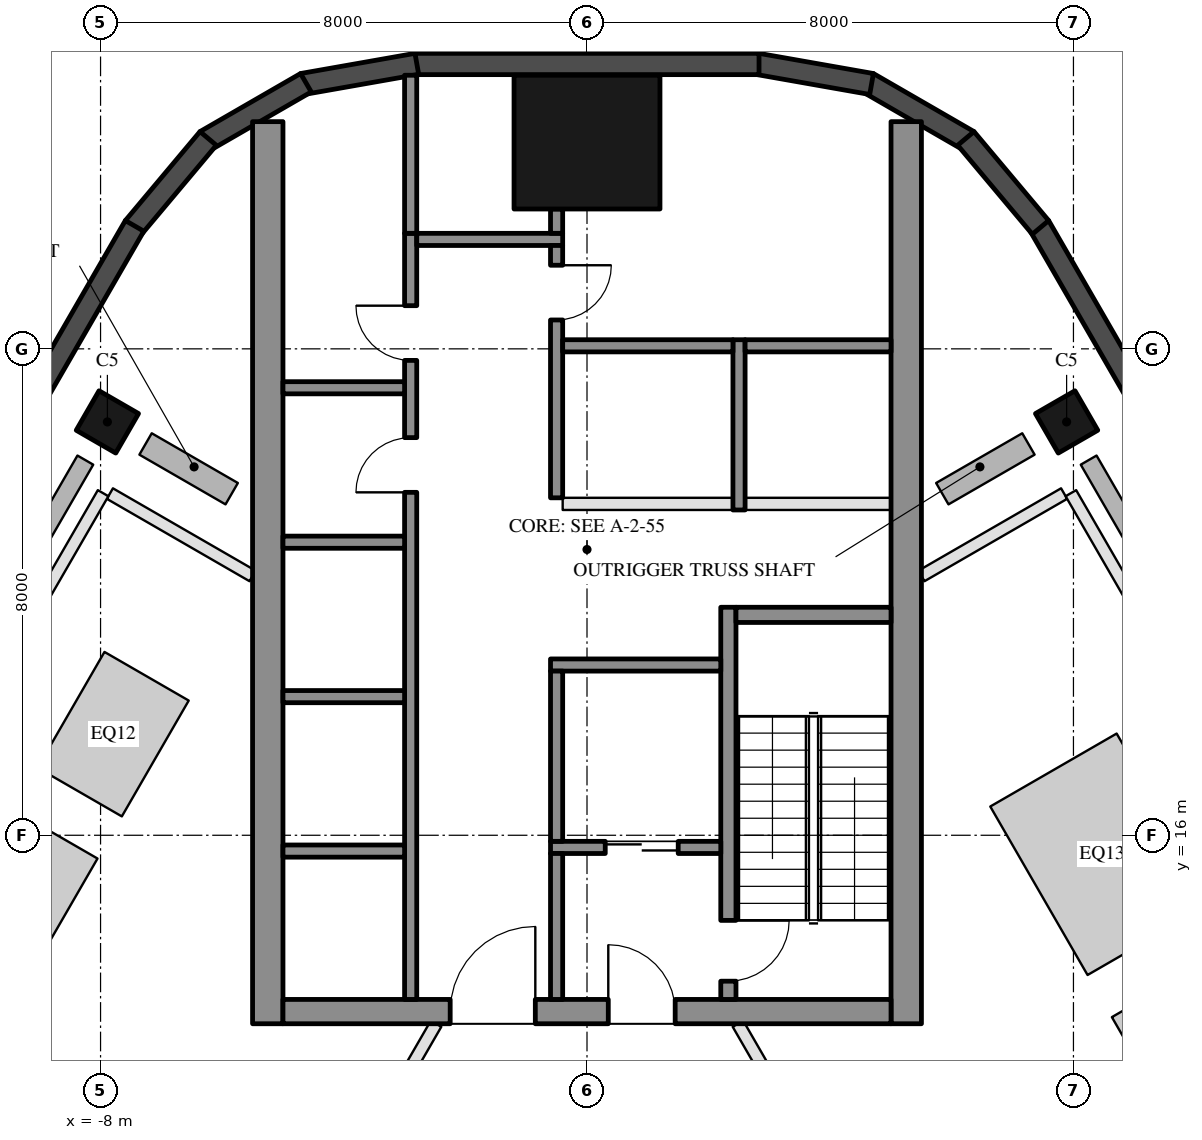
"""IFC4 building model, lengths in metres.
Left out: names, types, materials, properties, quantities, classifications, styles, units other than length and angle.
Written with IfcOpenShell. Run it as: python <this file> out.ifc"""

import sys

from ifc_helpers import new_model, si_unit, direction, frame, frame_2d, origin, origin_2d, place, context, subcontext, project, spatial, rectangle, hollow_rectangle, extrude, element, fill, save


model = new_model("IFC4")
c1 = context("Model", 3, precision=1e-05, world=origin(), true_north=direction((0.0, 1.0)))
c2 = subcontext(c1, "Body", "Model", "MODEL_VIEW")
j1 = project(units=[si_unit("LENGTHUNIT", "METRE"), si_unit("PLANEANGLEUNIT", "RADIAN")], contexts=[c1])
p1 = place(None, origin())
s1 = spatial("IfcSite", under=j1, at=p1, CompositionType="ELEMENT")
p2 = place(p1, origin())
s2 = spatial("IfcBuilding", under=s1, at=p2, CompositionType="ELEMENT")
p3 = place(p2, frame((0.0, 0.0, 237.7)))
s3 = spatial("IfcBuildingStorey", under=s2, at=p3, CompositionType="ELEMENT", Elevation=237.7)
for number, where, z_axis, x_axis in (
    (1, (7.888, 22.798, 0.0), (0.0, 0.0, 1.0), (-0.5, 0.866, 0.0)),
    (2, (-7.888, 22.798, 0.0), (0.0, 0.0, 1.0), (0.5, 0.866, 0.0)),
):
    element("IfcColumn", number, at=place(p3, frame(where, z_axis=z_axis, x_axis=x_axis)), inside=s3, PredefinedType="COLUMN", context=c2, shape_type="SweptSolid", body=[
        extrude(hollow_rectangle(XDim=0.75, YDim=0.75, WallThickness=0.035, at=origin_2d()), origin(), (0.0, 0.0, 1.0), 4.5),
    ])
p4 = place(p3, frame((0.0, 27.4, 0.0), z_axis=(0.0, 0.0, 1.0), x_axis=(1.0, 0.0, 0.0)))
e3 = element("IfcColumn", 3, at=p4, inside=s3, PredefinedType="COLUMN", context=c2, shape_type="SweptSolid", body=[
    extrude(hollow_rectangle(XDim=2.4, YDim=2.2, WallThickness=0.06, at=origin_2d()), origin(), (0.0, 0.0, 1.0), 4.5),
])
for number, where, z_axis, x_axis in (
    (4, (6.277, 27.422, 0.0), (0.0, 0.0, 1.0), (-0.866, 0.5, 0.0)),
    (5, (4.68, 28.356, 0.0), (0.0, 0.0, 1.0), (-0.985, 0.174, 0.0)),
):
    element("IfcWall", number, at=place(p3, frame(where, z_axis=z_axis, x_axis=x_axis)), inside=s3, PredefinedType="SOLIDWALL", context=c2, shape_type="SweptSolid", body=[
        extrude(rectangle(XDim=1.91, YDim=0.35, at=frame_2d((0.955, 0.0))), origin(), (0.0, 0.0, 1.0), 4.2),
    ])
p5 = place(p3, frame((2.829, 28.685, 0.0), z_axis=(0.0, 0.0, 1.0), x_axis=(-1.0, 0.0, 0.0)))
e6 = element("IfcWall", 6, at=p5, inside=s3, PredefinedType="SOLIDWALL", context=c2, shape_type="SweptSolid", body=[
    extrude(rectangle(XDim=5.658, YDim=0.35, at=frame_2d((2.829, 0.0))), origin(), (0.0, 0.0, 1.0), 4.2),
])
for number, where, z_axis, x_axis in (
    (7, (-2.799, 28.688, 0.0), (0.0, 0.0, 1.0), (-0.985, -0.174, 0.0)),
    (8, (-4.623, 28.377, 0.0), (0.0, 0.0, 1.0), (-0.866, -0.5, 0.0)),
):
    element("IfcWall", number, at=place(p3, frame(where, z_axis=z_axis, x_axis=x_axis)), inside=s3, PredefinedType="SOLIDWALL", context=c2, shape_type="SweptSolid", body=[
        extrude(rectangle(XDim=1.91, YDim=0.35, at=frame_2d((0.955, 0.0))), origin(), (0.0, 0.0, 1.0), 4.2),
    ])
p6 = place(p3, frame((-6.23, 27.461, 0.0), z_axis=(0.0, 0.0, 1.0), x_axis=(-0.642808304945, -0.766027077259, 0.0)))
e9 = element("IfcWall", 9, at=p6, inside=s3, PredefinedType="SOLIDWALL", context=c2, shape_type="SweptSolid", body=[
    extrude(rectangle(XDim=1.91, YDim=0.35, at=frame_2d((0.955, 0.0))), origin(), (0.0, 0.0, 1.0), 4.2),
])
for number, where, z_axis, x_axis in (
    (10, (-7.441, 26.022, 0.0), (0.0, 0.0, 1.0), (-0.5, -0.866, 0.0)),
    (11, (26.256, -6.567, 0.0), (0.0, 0.0, 1.0), (-0.5, 0.866, 0.0)),
):
    element("IfcWall", number, at=place(p3, frame(where, z_axis=z_axis, x_axis=x_axis)), inside=s3, PredefinedType="SOLIDWALL", context=c2, shape_type="SweptSolid", body=[
        extrude(rectangle(XDim=37.631, YDim=0.35, at=frame_2d((18.816, 0.0))), origin(), (0.0, 0.0, 1.0), 4.2),
    ])
p7 = place(p3, frame((7.458, 25.998, 0.0), z_axis=(0.0, 0.0, 1.0), x_axis=(-0.642808304945, 0.766027077259, 0.0)))
e12 = element("IfcWall", 12, at=p7, inside=s3, PredefinedType="SOLIDWALL", context=c2, shape_type="SweptSolid", body=[
    extrude(rectangle(XDim=1.91, YDim=0.35, at=frame_2d((0.955, 0.0))), origin(), (0.0, 0.0, 1.0), 4.2),
])
for number, where, z_axis, x_axis in (
    (13, (5.25, 12.9, 0.0), (0.0, 0.0, 1.0), (0.0, 1.0, 0.0)),
    (14, (-5.25, 12.9, 0.0), (0.0, 0.0, 1.0), (0.0, 1.0, 0.0)),
):
    element("IfcWall", number, at=place(p3, frame(where, z_axis=z_axis, x_axis=x_axis)), inside=s3, PredefinedType="SHEAR", context=c2, shape_type="SweptSolid", body=[
        extrude(rectangle(XDim=14.837, YDim=0.5, at=frame_2d((7.418, 0.0))), origin(), (0.0, 0.0, 1.0), 4.2),
    ])
p8 = place(p3, frame((5.0, 13.1, 0.0), z_axis=(0.0, 0.0, 1.0), x_axis=(-1.0, 0.0, 0.0)))
e15 = element("IfcWall", 15, at=p8, inside=s3, PredefinedType="SHEAR", context=c2, shape_type="SweptSolid", body=[
    extrude(rectangle(XDim=10.0, YDim=0.4, at=frame_2d((5.0, 0.0))), origin(), (0.0, 0.0, 1.0), 4.2),
])
p9 = place(p8, frame((3.55, 0.0, 0.0)))
e16 = element("IfcOpeningElement", 16, at=p9, cuts=e15, PredefinedType="OPENING", context=c2, shape_type="SweptSolid", body=[
    extrude(rectangle(XDim=1.1, YDim=2.1, at=frame_2d((0.55, 1.05))), frame((0.0, 0.21, 0.0), z_axis=(0.0, -1.0, 0.0), x_axis=(1.0, 0.0, 0.0)), (0.0, 0.0, 1.0), 0.42),
])
p10 = place(p8, frame((5.85, 0.0, 0.0)))
e17 = element("IfcOpeningElement", 17, at=p10, cuts=e15, PredefinedType="OPENING", context=c2, shape_type="SweptSolid", body=[
    extrude(rectangle(XDim=1.4, YDim=2.1, at=frame_2d((0.7, 1.05))), frame((0.0, 0.21, 0.0), z_axis=(0.0, -1.0, 0.0), x_axis=(1.0, 0.0, 0.0)), (0.0, 0.0, 1.0), 0.42),
])
p11 = place(p3, frame((2.325, 13.3, 0.0), z_axis=(0.0, 0.0, 1.0), x_axis=(0.0, 1.0, 0.0)))
e18 = element("IfcWall", 18, at=p11, inside=s3, PredefinedType="SHEAR", context=c2, shape_type="SweptSolid", body=[
    extrude(rectangle(XDim=6.45, YDim=0.25, at=frame_2d((3.225, 0.0))), origin(), (0.0, 0.0, 1.0), 4.2),
])
p12 = place(p11, frame((0.3, 0.0, 0.0)))
e19 = element("IfcOpeningElement", 19, at=p12, cuts=e18, PredefinedType="OPENING", context=c2, shape_type="SweptSolid", body=[
    extrude(rectangle(XDim=1.0, YDim=2.1, at=frame_2d((0.5, 1.05))), frame((0.0, 0.135, 0.0), z_axis=(0.0, -1.0, 0.0), x_axis=(1.0, 0.0, 0.0)), (0.0, 0.0, 1.0), 0.27),
])
p13 = place(p3, frame((5.0, 19.625, 0.0), z_axis=(0.0, 0.0, 1.0), x_axis=(-1.0, 0.0, 0.0)))
e20 = element("IfcWall", 20, at=p13, inside=s3, PredefinedType="SHEAR", context=c2, shape_type="SweptSolid", body=[
    extrude(rectangle(XDim=2.55, YDim=0.25, at=frame_2d((1.275, 0.0))), origin(), (0.0, 0.0, 1.0), 4.2),
])
p14 = place(p3, frame((2.2, 18.8, 0.0), z_axis=(0.0, 0.0, 1.0), x_axis=(-1.0, 0.0, 0.0)))
e21 = element("IfcWall", 21, at=p14, inside=s3, PredefinedType="SHEAR", context=c2, shape_type="SweptSolid", body=[
    extrude(rectangle(XDim=2.8, YDim=0.2, at=frame_2d((1.4, 0.0))), origin(), (0.0, 0.0, 1.0), 4.2),
])
p15 = place(p3, frame((2.2, 15.8, 0.0), z_axis=(0.0, 0.0, 1.0), x_axis=(-1.0, 0.0, 0.0)))
e22 = element("IfcWall", 22, at=p15, inside=s3, PredefinedType="SHEAR", context=c2, shape_type="SweptSolid", body=[
    extrude(rectangle(XDim=2.8, YDim=0.2, at=frame_2d((1.4, 0.0))), origin(), (0.0, 0.0, 1.0), 4.2),
])
p16 = place(p15, frame((0.7, 0.0, 0.0)))
e23 = element("IfcOpeningElement", 23, at=p16, cuts=e22, PredefinedType="OPENING", context=c2, shape_type="SweptSolid", body=[
    extrude(rectangle(XDim=1.2, YDim=2.1, at=frame_2d((0.6, 1.05))), frame((0.0, 0.11, 0.0), z_axis=(0.0, -1.0, 0.0), x_axis=(1.0, 0.0, 0.0)), (0.0, 0.0, 1.0), 0.22),
])
p17 = place(p3, frame((-0.5, 15.9, 0.0), z_axis=(0.0, 0.0, 1.0), x_axis=(0.0, 1.0, 0.0)))
e24 = element("IfcWall", 24, at=p17, inside=s3, PredefinedType="SHEAR", context=c2, shape_type="SweptSolid", body=[
    extrude(rectangle(XDim=2.8, YDim=0.2, at=frame_2d((1.4, 0.0))), origin(), (0.0, 0.0, 1.0), 4.2),
])
p18 = place(p3, frame((-0.5, 13.3, 0.0), z_axis=(0.0, 0.0, 1.0), x_axis=(0.0, 1.0, 0.0)))
e25 = element("IfcWall", 25, at=p18, inside=s3, PredefinedType="SHEAR", context=c2, shape_type="SweptSolid", body=[
    extrude(rectangle(XDim=2.4, YDim=0.2, at=frame_2d((1.2, 0.0))), origin(), (0.0, 0.0, 1.0), 4.2),
])
p19 = place(p3, frame((-2.9, 13.3, 0.0), z_axis=(0.0, 0.0, 1.0), x_axis=(0.0, 1.0, 0.0)))
e26 = element("IfcWall", 26, at=p19, inside=s3, PredefinedType="SHEAR", context=c2, shape_type="SweptSolid", body=[
    extrude(rectangle(XDim=12.6, YDim=0.2, at=frame_2d((6.3, 0.0))), origin(), (0.0, 0.0, 1.0), 4.2),
])
p20 = place(p19, frame((8.34, 0.0, 0.0)))
e27 = element("IfcOpeningElement", 27, at=p20, cuts=e26, PredefinedType="OPENING", context=c2, shape_type="SweptSolid", body=[
    extrude(rectangle(XDim=0.9, YDim=2.1, at=frame_2d((0.45, 1.05))), frame((0.0, 0.11, 0.0), z_axis=(0.0, -1.0, 0.0), x_axis=(1.0, 0.0, 0.0)), (0.0, 0.0, 1.0), 0.22),
])
p21 = place(p19, frame((10.51, 0.0, 0.0)))
e28 = element("IfcOpeningElement", 28, at=p21, cuts=e26, PredefinedType="OPENING", context=c2, shape_type="SweptSolid", body=[
    extrude(rectangle(XDim=0.9, YDim=2.1, at=frame_2d((0.45, 1.05))), frame((0.0, 0.11, 0.0), z_axis=(0.0, -1.0, 0.0), x_axis=(1.0, 0.0, 0.0)), (0.0, 0.0, 1.0), 0.22),
])
p22 = place(p3, frame((-0.4, 25.8, 0.0), z_axis=(0.0, 0.0, 1.0), x_axis=(-1.0, 0.0, 0.0)))
e29 = element("IfcWall", 29, at=p22, inside=s3, PredefinedType="SHEAR", context=c2, shape_type="SweptSolid", body=[
    extrude(rectangle(XDim=2.4, YDim=0.2, at=frame_2d((1.2, 0.0))), origin(), (0.0, 0.0, 1.0), 4.2),
])
p23 = place(p3, frame((-0.5, 21.55, 0.0), z_axis=(0.0, 0.0, 1.0), x_axis=(0.0, 1.0, 0.0)))
e30 = element("IfcWall", 30, at=p23, inside=s3, PredefinedType="SHEAR", context=c2, shape_type="SweptSolid", body=[
    extrude(rectangle(XDim=4.15, YDim=0.2, at=frame_2d((2.075, 0.0))), origin(), (0.0, 0.0, 1.0), 4.2),
])
p24 = place(p23, frame((2.925, 0.0, 0.0)))
e31 = element("IfcOpeningElement", 31, at=p24, cuts=e30, PredefinedType="OPENING", context=c2, shape_type="SweptSolid", body=[
    extrude(rectangle(XDim=0.9, YDim=2.1, at=frame_2d((0.45, 1.05))), frame((0.0, 0.11, 0.0), z_axis=(0.0, -1.0, 0.0), x_axis=(1.0, 0.0, 0.0)), (0.0, 0.0, 1.0), 0.22),
])
for number, where, z_axis, x_axis in (
    (32, (-3.0, 15.74, 0.0), (0.0, 0.0, 1.0), (-1.0, 0.0, 0.0)),
    (33, (-3.0, 18.28, 0.0), (0.0, 0.0, 1.0), (-1.0, 0.0, 0.0)),
    (34, (-3.0, 20.82, 0.0), (0.0, 0.0, 1.0), (-1.0, 0.0, 0.0)),
    (35, (-3.0, 23.36, 0.0), (0.0, 0.0, 1.0), (-1.0, 0.0, 0.0)),
):
    element("IfcWall", number, at=place(p3, frame(where, z_axis=z_axis, x_axis=x_axis)), inside=s3, PredefinedType="SHEAR", context=c2, shape_type="SweptSolid", body=[
        extrude(rectangle(XDim=2.0, YDim=0.2, at=frame_2d((1.0, 0.0))), origin(), (0.0, 0.0, 1.0), 4.2),
    ])
p25 = place(p3, frame((-0.5, 25.9, 0.0), z_axis=(0.0, 0.0, 1.0), x_axis=(0.0, 1.0, 0.0)))
e36 = element("IfcWall", 36, at=p25, inside=s3, PredefinedType="SHEAR", context=c2, shape_type="SweptSolid", body=[
    extrude(rectangle(XDim=0.4, YDim=0.2, at=frame_2d((0.2, 0.0))), origin(), (0.0, 0.0, 1.0), 4.2),
])
p26 = place(p3, frame((-2.9, 25.9, 0.0), z_axis=(0.0, 0.0, 1.0), x_axis=(0.0, 1.0, 0.0)))
e37 = element("IfcWall", 37, at=p26, inside=s3, PredefinedType="SHEAR", context=c2, shape_type="SweptSolid", body=[
    extrude(rectangle(XDim=2.6, YDim=0.2, at=frame_2d((1.3, 0.0))), origin(), (0.0, 0.0, 1.0), 4.2),
])
p27 = place(p3, frame((2.5, 21.35, 0.0), z_axis=(0.0, 0.0, 1.0), x_axis=(0.0, 1.0, 0.0)))
e38 = element("IfcWall", 38, at=p27, inside=s3, PredefinedType="SHEAR", context=c2, shape_type="SweptSolid", body=[
    extrude(rectangle(XDim=2.8, YDim=0.2, at=frame_2d((1.4, 0.0))), origin(), (0.0, 0.0, 1.0), 4.2),
])
p28 = place(p3, frame((5.0, 24.05, 0.0), z_axis=(0.0, 0.0, 1.0), x_axis=(-1.0, 0.0, 0.0)))
e39 = element("IfcWall", 39, at=p28, inside=s3, PredefinedType="SHEAR", context=c2, shape_type="SweptSolid", body=[
    extrude(rectangle(XDim=2.4, YDim=0.2, at=frame_2d((1.2, 0.0))), origin(), (0.0, 0.0, 1.0), 4.2),
])
p29 = place(p3, frame((2.4, 24.05, 0.0), z_axis=(0.0, 0.0, 1.0), x_axis=(-1.0, 0.0, 0.0)))
e40 = element("IfcWall", 40, at=p29, inside=s3, PredefinedType="SHEAR", context=c2, shape_type="SweptSolid", body=[
    extrude(rectangle(XDim=2.8, YDim=0.2, at=frame_2d((1.4, 0.0))), origin(), (0.0, 0.0, 1.0), 4.2),
])
p30 = place(p3, frame((5.0, 21.45, 0.0), z_axis=(0.0, 0.0, 1.0), x_axis=(-1.0, 0.0, 0.0)))
e41 = element("IfcWall", 41, at=p30, inside=s3, PredefinedType="PARTITIONING", context=c2, shape_type="SweptSolid", body=[
    extrude(rectangle(XDim=2.4, YDim=0.2, at=frame_2d((1.2, 0.0))), origin(), (0.0, 0.0, 1.0), 4.2),
])
p31 = place(p3, frame((2.4, 21.45, 0.0), z_axis=(0.0, 0.0, 1.0), x_axis=(-1.0, 0.0, 0.0)))
e42 = element("IfcWall", 42, at=p31, inside=s3, PredefinedType="PARTITIONING", context=c2, shape_type="SweptSolid", body=[
    extrude(rectangle(XDim=2.8, YDim=0.2, at=frame_2d((1.4, 0.0))), origin(), (0.0, 0.0, 1.0), 4.2),
])
p32 = place(p3, frame((7.846, 21.62, 0.0), z_axis=(0.0, 0.0, 1.0), x_axis=(-0.866022026288, -0.50000584995, 0.0)))
e43 = element("IfcWall", 43, at=p32, inside=s3, PredefinedType="PARTITIONING", context=c2, shape_type="SweptSolid", body=[
    extrude(rectangle(XDim=2.709, YDim=0.2, at=frame_2d((1.355, 0.0))), origin(), (0.0, 0.0, 1.0), 4.2),
])
p33 = place(p3, frame((22.708, -3.921, 0.0), z_axis=(0.0, 0.0, 1.0), x_axis=(-0.499998500593, 0.866026269466, 0.0)))
e44 = element("IfcWall", 44, at=p33, inside=s3, PredefinedType="PARTITIONING", context=c2, shape_type="SweptSolid", body=[
    extrude(rectangle(XDim=29.5, YDim=0.2, at=frame_2d((14.75, 0.0))), origin(), (0.0, 0.0, 1.0), 3.41),
])
p34 = place(p3, frame((12.413, -4.3, 0.0), z_axis=(0.0, 0.0, 1.0), x_axis=(-0.50000478328, 0.866022642139, 0.0)))
e45 = element("IfcWall", 45, at=p34, inside=s3, PredefinedType="PARTITIONING", context=c2, shape_type="SweptSolid", body=[
    extrude(rectangle(XDim=19.861, YDim=0.2, at=frame_2d((9.931, 0.0))), origin(), (0.0, 0.0, 1.0), 3.41),
])
p35 = place(p34, frame((2.371, 0.0, 0.0)))
e46 = element("IfcOpeningElement", 46, at=p35, cuts=e45, PredefinedType="OPENING", context=c2, shape_type="SweptSolid", body=[
    extrude(rectangle(XDim=1.2, YDim=2.1, at=frame_2d((0.6, 1.05))), frame((0.0, 0.11, 0.0), z_axis=(0.0, -1.0, 0.0), x_axis=(1.0, 0.0, 0.0)), (0.0, 0.0, 1.0), 0.22),
])
p36 = place(p34, frame((8.581, 0.0, 0.0)))
e47 = element("IfcOpeningElement", 47, at=p36, cuts=e45, PredefinedType="OPENING", context=c2, shape_type="SweptSolid", body=[
    extrude(rectangle(XDim=1.2, YDim=2.1, at=frame_2d((0.6, 1.05))), frame((0.0, 0.11, 0.0), z_axis=(0.0, -1.0, 0.0), x_axis=(1.0, 0.0, 0.0)), (0.0, 0.0, 1.0), 0.22),
])
p37 = place(p34, frame((15.54, 0.0, 0.0)))
e48 = element("IfcOpeningElement", 48, at=p37, cuts=e45, PredefinedType="OPENING", context=c2, shape_type="SweptSolid", body=[
    extrude(rectangle(XDim=1.2, YDim=2.1, at=frame_2d((0.6, 1.05))), frame((0.0, 0.11, 0.0), z_axis=(0.0, -1.0, 0.0), x_axis=(1.0, 0.0, 0.0)), (0.0, 0.0, 1.0), 0.22),
])
p38 = place(p3, frame((-7.846, 21.62, 0.0), z_axis=(0.0, 0.0, 1.0), x_axis=(0.866022026288, -0.50000584995, 0.0)))
e49 = element("IfcWall", 49, at=p38, inside=s3, PredefinedType="PARTITIONING", context=c2, shape_type="SweptSolid", body=[
    extrude(rectangle(XDim=2.709, YDim=0.2, at=frame_2d((1.355, 0.0))), origin(), (0.0, 0.0, 1.0), 4.2),
])
p39 = place(p3, frame((-7.958, 21.626, 0.0), z_axis=(0.0, 0.0, 1.0), x_axis=(-0.499998500593, -0.866026269466, 0.0)))
e50 = element("IfcWall", 50, at=p39, inside=s3, PredefinedType="PARTITIONING", context=c2, shape_type="SweptSolid", body=[
    extrude(rectangle(XDim=29.5, YDim=0.2, at=frame_2d((14.75, 0.0))), origin(), (0.0, 0.0, 1.0), 3.41),
])
p40 = place(p3, frame((-2.482, 12.9, 0.0), z_axis=(0.0, 0.0, 1.0), x_axis=(-0.50000478328, -0.866022642139, 0.0)))
e51 = element("IfcWall", 51, at=p40, inside=s3, PredefinedType="PARTITIONING", context=c2, shape_type="SweptSolid", body=[
    extrude(rectangle(XDim=19.861, YDim=0.2, at=frame_2d((9.931, 0.0))), origin(), (0.0, 0.0, 1.0), 3.41),
])
p41 = place(p40, frame((3.371, 0.0, 0.0)))
e52 = element("IfcOpeningElement", 52, at=p41, cuts=e51, PredefinedType="OPENING", context=c2, shape_type="SweptSolid", body=[
    extrude(rectangle(XDim=1.2, YDim=2.1, at=frame_2d((0.6, 1.05))), frame((0.0, 0.11, 0.0), z_axis=(0.0, -1.0, 0.0), x_axis=(1.0, 0.0, 0.0)), (0.0, 0.0, 1.0), 0.22),
])
p42 = place(p40, frame((10.331, 0.0, 0.0)))
e53 = element("IfcOpeningElement", 53, at=p42, cuts=e51, PredefinedType="OPENING", context=c2, shape_type="SweptSolid", body=[
    extrude(rectangle(XDim=1.2, YDim=2.1, at=frame_2d((0.6, 1.05))), frame((0.0, 0.11, 0.0), z_axis=(0.0, -1.0, 0.0), x_axis=(1.0, 0.0, 0.0)), (0.0, 0.0, 1.0), 0.22),
])
p43 = place(p40, frame((16.29, 0.0, 0.0)))
e54 = element("IfcOpeningElement", 54, at=p43, cuts=e51, PredefinedType="OPENING", context=c2, shape_type="SweptSolid", body=[
    extrude(rectangle(XDim=1.2, YDim=2.1, at=frame_2d((0.6, 1.05))), frame((0.0, 0.11, 0.0), z_axis=(0.0, -1.0, 0.0), x_axis=(1.0, 0.0, 0.0)), (0.0, 0.0, 1.0), 0.22),
])
p44 = place(p16, origin())
e55 = element("IfcDoor", 55, at=p44, inside=s3, OperationType="DOUBLE_DOOR_SLIDING", PredefinedType="DOOR", context=c2, shape_type="SweptSolid", body=[
    extrude(rectangle(XDim=1.2, YDim=2.1, at=frame_2d((0.6, 1.05))), frame((0.0, 0.025, 0.0), z_axis=(0.0, -1.0, 0.0), x_axis=(1.0, 0.0, 0.0)), (0.0, 0.0, 1.0), 0.05),
])
fill(e23, e55)
p45 = place(p20, origin())
e56 = element("IfcDoor", 56, at=p45, inside=s3, OperationType="SINGLE_SWING_LEFT", PredefinedType="DOOR", context=c2, shape_type="SweptSolid", body=[
    extrude(rectangle(XDim=0.9, YDim=2.1, at=frame_2d((0.45, 1.05))), frame((0.0, 0.025, 0.0), z_axis=(0.0, -1.0, 0.0), x_axis=(1.0, 0.0, 0.0)), (0.0, 0.0, 1.0), 0.05),
])
fill(e27, e56)
p46 = place(p21, origin())
e57 = element("IfcDoor", 57, at=p46, inside=s3, OperationType="SINGLE_SWING_RIGHT", PredefinedType="DOOR", context=c2, shape_type="SweptSolid", body=[
    extrude(rectangle(XDim=0.9, YDim=2.1, at=frame_2d((0.45, 1.05))), frame((0.0, 0.025, 0.0), z_axis=(0.0, -1.0, 0.0), x_axis=(1.0, 0.0, 0.0)), (0.0, 0.0, 1.0), 0.05),
])
fill(e28, e57)
p47 = place(p24, frame((0.9, 0.0, 0.0), z_axis=(0.0, 0.0, 1.0), x_axis=(-1.0, 0.0, 0.0)))
e58 = element("IfcDoor", 58, at=p47, inside=s3, OperationType="SINGLE_SWING_LEFT", PredefinedType="DOOR", context=c2, shape_type="SweptSolid", body=[
    extrude(rectangle(XDim=0.9, YDim=2.1, at=frame_2d((0.45, 1.05))), frame((0.0, 0.025, 0.0), z_axis=(0.0, -1.0, 0.0), x_axis=(1.0, 0.0, 0.0)), (0.0, 0.0, 1.0), 0.05),
])
fill(e31, e58)
p48 = place(p9, frame((1.1, 0.0, 0.0), z_axis=(0.0, 0.0, 1.0), x_axis=(-1.0, 0.0, 0.0)))
e59 = element("IfcDoor", 59, at=p48, inside=s3, OperationType="SINGLE_SWING_LEFT", PredefinedType="DOOR", context=c2, shape_type="SweptSolid", body=[
    extrude(rectangle(XDim=1.1, YDim=2.1, at=frame_2d((0.55, 1.05))), frame((0.0, 0.025, 0.0), z_axis=(0.0, -1.0, 0.0), x_axis=(1.0, 0.0, 0.0)), (0.0, 0.0, 1.0), 0.05),
])
fill(e16, e59)
p49 = place(p10, frame((1.4, 0.0, 0.0), z_axis=(0.0, 0.0, 1.0), x_axis=(-1.0, 0.0, 0.0)))
e60 = element("IfcDoor", 60, at=p49, inside=s3, OperationType="DOUBLE_DOOR_SINGLE_SWING", PredefinedType="DOOR", context=c2, shape_type="SweptSolid", body=[
    extrude(rectangle(XDim=1.4, YDim=2.1, at=frame_2d((0.7, 1.05))), frame((0.0, 0.025, 0.0), z_axis=(0.0, -1.0, 0.0), x_axis=(1.0, 0.0, 0.0)), (0.0, 0.0, 1.0), 0.05),
])
fill(e17, e60)
p50 = place(p12, frame((1.0, 0.0, 0.0), z_axis=(0.0, 0.0, 1.0), x_axis=(-1.0, 0.0, 0.0)))
e61 = element("IfcDoor", 61, at=p50, inside=s3, OperationType="SINGLE_SWING_LEFT", PredefinedType="DOOR", context=c2, shape_type="SweptSolid", body=[
    extrude(rectangle(XDim=1.0, YDim=2.1, at=frame_2d((0.5, 1.05))), frame((0.0, 0.025, 0.0), z_axis=(0.0, -1.0, 0.0), x_axis=(1.0, 0.0, 0.0)), (0.0, 0.0, 1.0), 0.05),
])
fill(e19, e61)
save(model, sys.argv[1])
